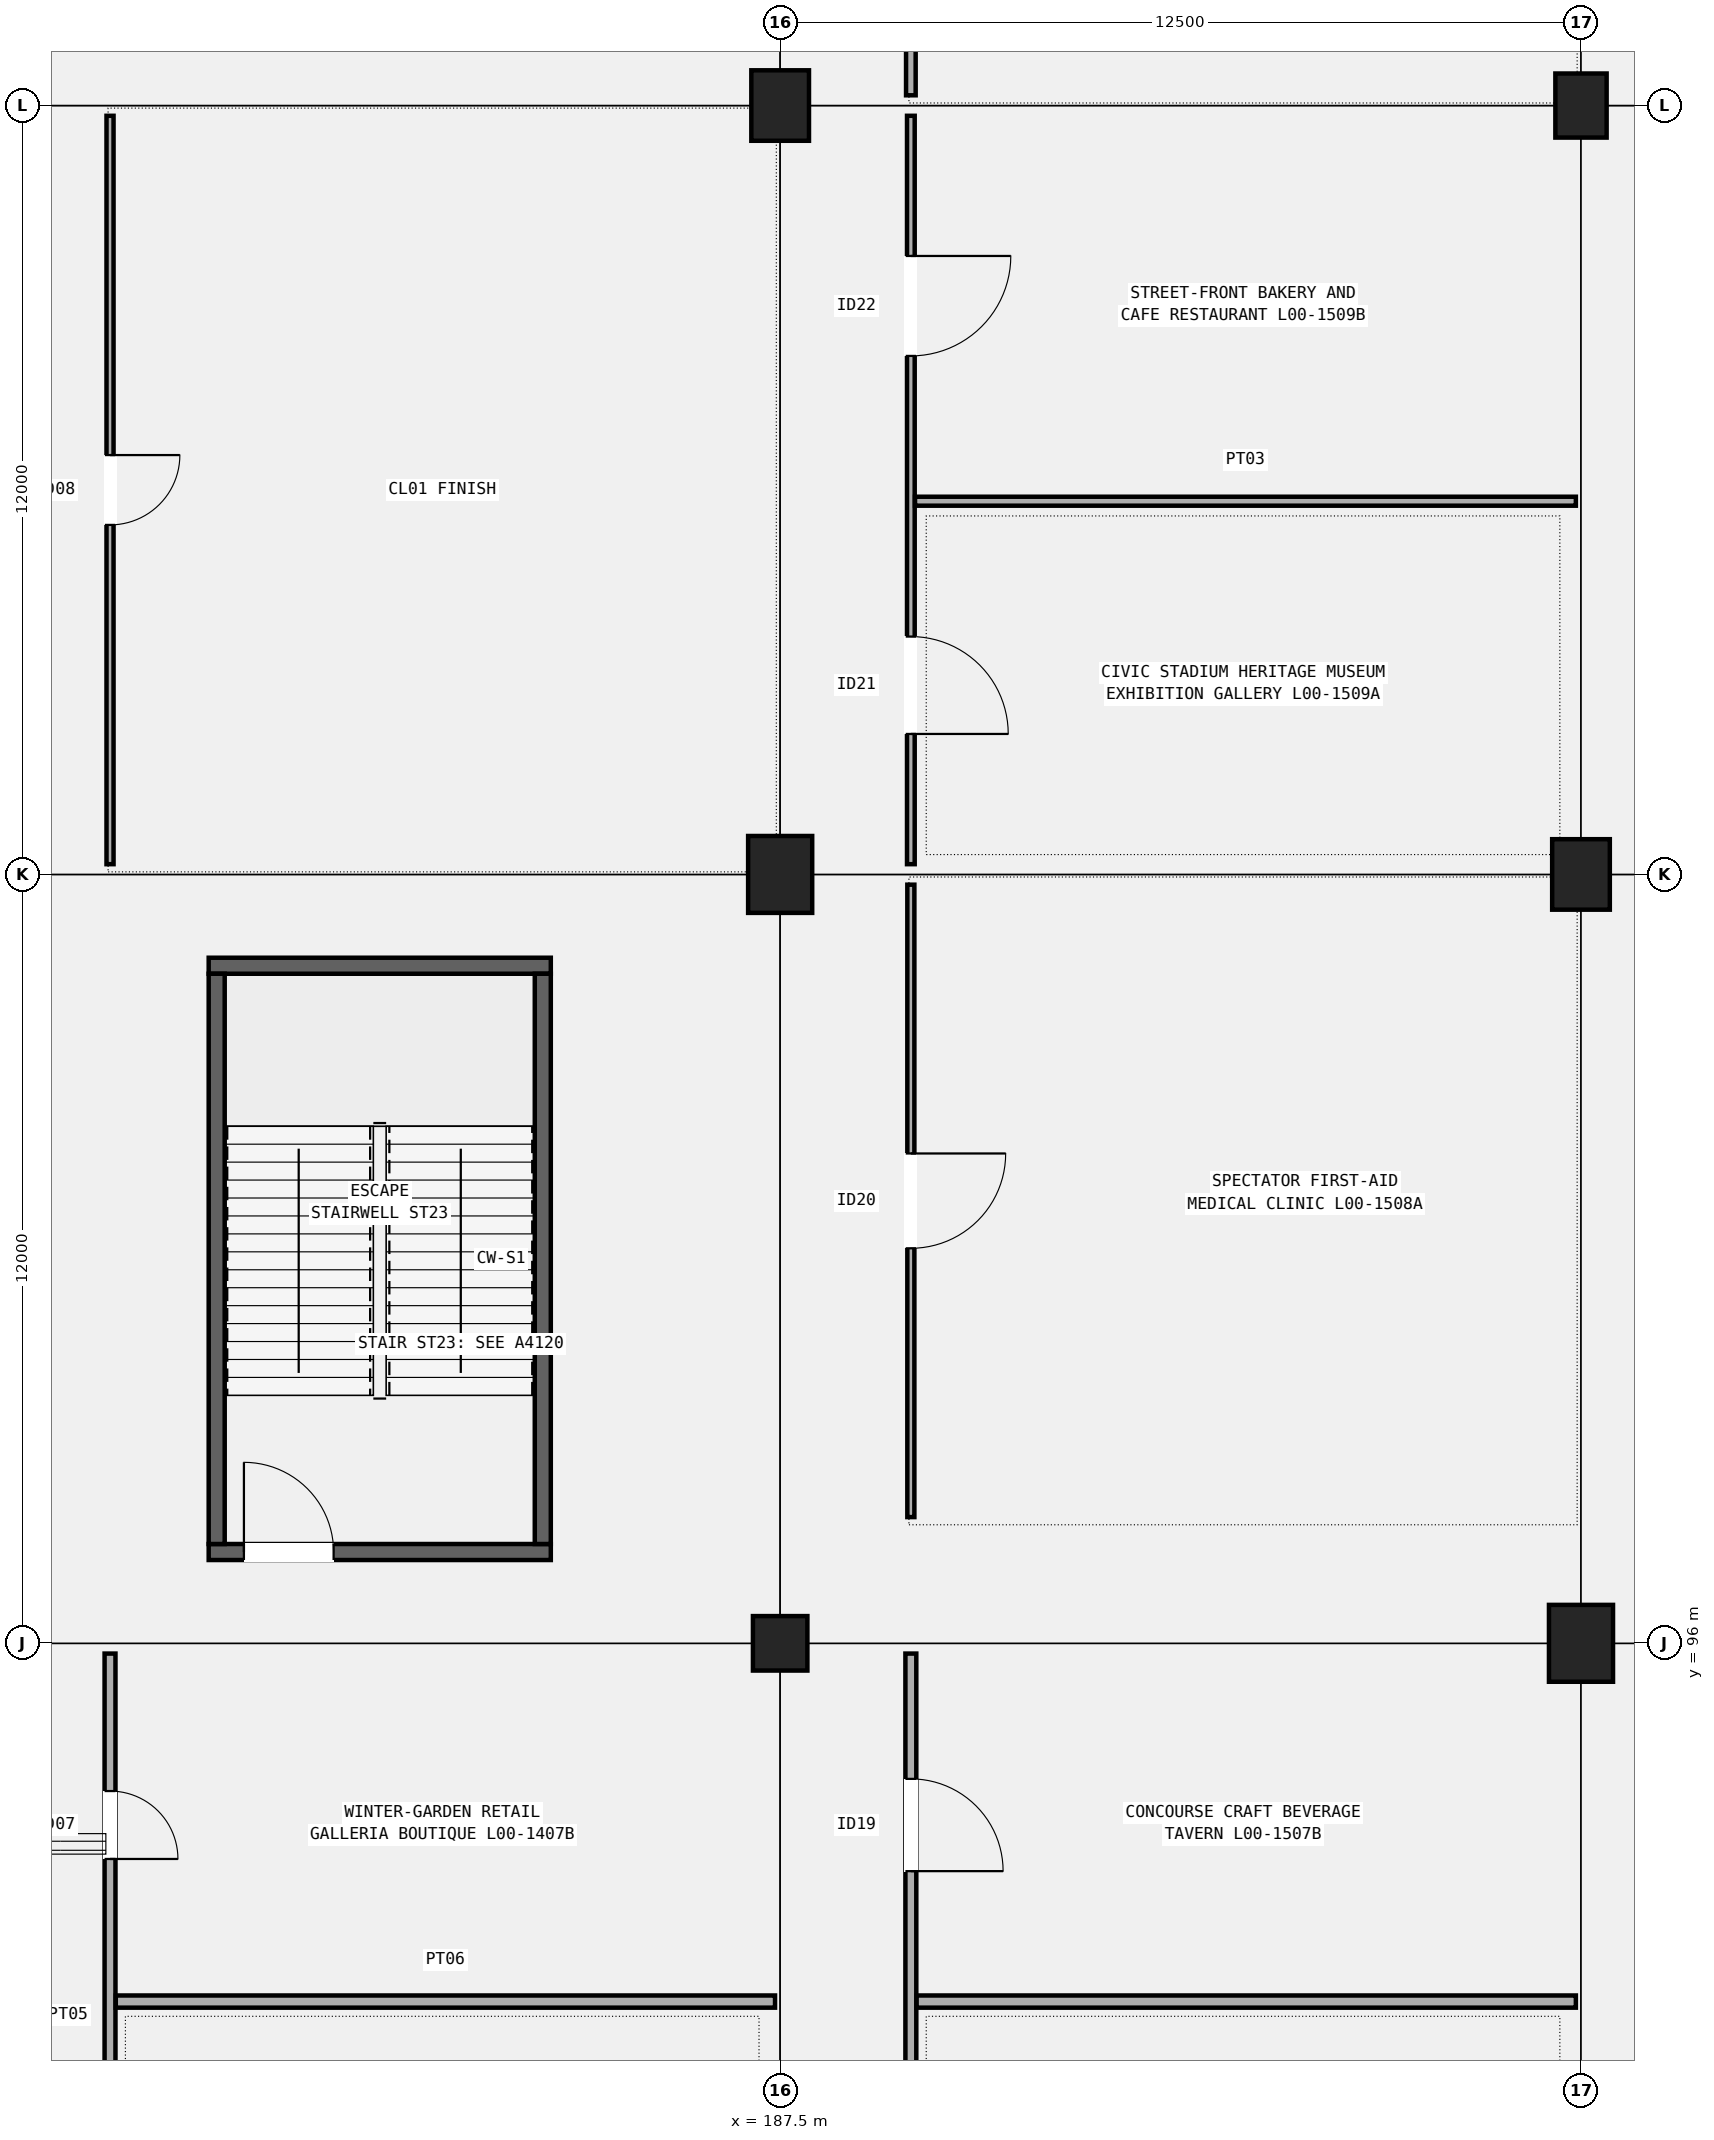
"""IFC4 building model, lengths in metres.
Left out: names, types, materials, properties, quantities, classifications, styles, units other than length and angle.
Written with IfcOpenShell. Run it as: python <this file> out.ifc"""

import sys

from ifc_helpers import new_model, si_unit, direction, frame, frame_2d, origin, origin_2d, place, context, subcontext, project, spatial, rectangle, circle, extrude, element, fill, save


model = new_model("IFC4")
c1 = context("Model", 3, precision=1e-05, world=origin(), true_north=direction((0.0, 1.0)))
c2 = subcontext(c1, "Body", "Model", "MODEL_VIEW")
j1 = project(units=[si_unit("LENGTHUNIT", "METRE"), si_unit("PLANEANGLEUNIT", "RADIAN")], contexts=[c1])
p1 = place(None, origin())
s1 = spatial("IfcSite", under=j1, at=p1, CompositionType="ELEMENT")
p2 = place(p1, origin())
s2 = spatial("IfcBuilding", under=s1, at=p2, CompositionType="ELEMENT")
p3 = place(p2, origin())
s3 = spatial("IfcBuildingStorey", under=s2, at=p3, CompositionType="ELEMENT", Elevation=0.0)
p4 = place(p3, frame((187.5, 96.0, 0.0), z_axis=(0.0, 0.0, 1.0), x_axis=(1.0, 0.0, 0.0)))
e1 = element("IfcColumn", 1, at=p4, inside=s3, PredefinedType="COLUMN", context=c2, shape_type="SweptSolid", body=[
    extrude(circle(Radius=0.425, at=origin_2d()), origin(), (0.0, 0.0, 1.0), 5.4),
])
p5 = place(p3, frame((187.5, 108.0, 0.0), z_axis=(0.0, 0.0, 1.0), x_axis=(1.0, 0.0, 0.0)))
e2 = element("IfcColumn", 2, at=p5, inside=s3, PredefinedType="COLUMN", context=c2, shape_type="SweptSolid", body=[
    extrude(rectangle(XDim=1.0, YDim=1.2, at=origin_2d()), origin(), (0.0, 0.0, 1.0), 5.4),
])
p6 = place(p3, frame((187.5, 120.0, 0.0), z_axis=(0.0, 0.0, 1.0), x_axis=(1.0, 0.0, 0.0)))
e3 = element("IfcColumn", 3, at=p6, inside=s3, PredefinedType="COLUMN", context=c2, shape_type="SweptSolid", body=[
    extrude(rectangle(XDim=0.9, YDim=1.1, at=origin_2d()), origin(), (0.0, 0.0, 1.0), 5.4),
])
p7 = place(p3, frame((200.0, 96.0, 0.0), z_axis=(0.0, 0.0, 1.0), x_axis=(1.0, 0.0, 0.0)))
e4 = element("IfcColumn", 4, at=p7, inside=s3, PredefinedType="COLUMN", context=c2, shape_type="SweptSolid", body=[
    extrude(rectangle(XDim=1.0, YDim=1.2, at=origin_2d()), origin(), (0.0, 0.0, 1.0), 5.4),
])
p8 = place(p3, frame((200.0, 108.0, 0.0), z_axis=(0.0, 0.0, 1.0), x_axis=(1.0, 0.0, 0.0)))
e5 = element("IfcColumn", 5, at=p8, inside=s3, PredefinedType="COLUMN", context=c2, shape_type="SweptSolid", body=[
    extrude(rectangle(XDim=0.9, YDim=1.1, at=origin_2d()), origin(), (0.0, 0.0, 1.0), 5.4),
])
p9 = place(p3, frame((200.0, 120.0, 0.0), z_axis=(0.0, 0.0, 1.0), x_axis=(1.0, 0.0, 0.0)))
e6 = element("IfcColumn", 6, at=p9, inside=s3, PredefinedType="COLUMN", context=c2, shape_type="SweptSolid", body=[
    extrude(rectangle(XDim=0.8, YDim=1.0, at=origin_2d()), origin(), (0.0, 0.0, 1.0), 5.4),
])
p10 = place(p3, frame((178.58, 97.425, 0.0), z_axis=(0.0, 0.0, 1.0), x_axis=(1.0, 0.0, 0.0)))
e7 = element("IfcWall", 7, at=p10, inside=s3, PredefinedType="SHEAR", context=c2, shape_type="SweptSolid", body=[
    extrude(rectangle(XDim=5.34, YDim=0.25, at=frame_2d((2.67, 0.0))), origin(), (0.0, 0.0, 1.0), 5.14),
])
p11 = place(p10, frame((0.55, 0.0, 0.0)))
e8 = element("IfcOpeningElement", 8, at=p11, cuts=e7, PredefinedType="OPENING", context=c2, shape_type="SweptSolid", body=[
    extrude(rectangle(XDim=1.4, YDim=2.15, at=frame_2d((0.7, 1.075))), frame((0.0, 0.135, 0.0), z_axis=(0.0, -1.0, 0.0), x_axis=(1.0, 0.0, 0.0)), (0.0, 0.0, 1.0), 0.27),
])
p12 = place(p3, frame((178.58, 106.575, 0.0), z_axis=(0.0, 0.0, 1.0), x_axis=(1.0, 0.0, 0.0)))
e9 = element("IfcWall", 9, at=p12, inside=s3, PredefinedType="SHEAR", context=c2, shape_type="SweptSolid", body=[
    extrude(rectangle(XDim=5.34, YDim=0.25, at=frame_2d((2.67, 0.0))), origin(), (0.0, 0.0, 1.0), 5.14),
])
for number, where, z_axis, x_axis in (
    (10, (178.705, 97.55, 0.0), (0.0, 0.0, 1.0), (0.0, 1.0, 0.0)),
    (11, (183.795, 97.55, 0.0), (0.0, 0.0, 1.0), (0.0, 1.0, 0.0)),
):
    element("IfcWall", number, at=place(p3, frame(where, z_axis=z_axis, x_axis=x_axis)), inside=s3, PredefinedType="SHEAR", context=c2, shape_type="SweptSolid", body=[
        extrude(rectangle(XDim=8.9, YDim=0.25, at=frame_2d((4.45, 0.0))), origin(), (0.0, 0.0, 1.0), 5.14),
    ])
p13 = place(p3, frame((177.04, 84.16, 0.0), z_axis=(0.0, 0.0, 1.0), x_axis=(0.0, 1.0, 0.0)))
e12 = element("IfcWall", 12, at=p13, inside=s3, PredefinedType="PARTITIONING", context=c2, shape_type="SweptSolid", body=[
    extrude(rectangle(XDim=11.68, YDim=0.17, at=frame_2d((5.84, 0.0))), origin(), (0.0, 0.0, 1.0), 4.52),
])
p14 = place(p13, frame((3.599, 0.0, 0.0), z_axis=(0.0, 0.0, 1.0), x_axis=(-1.0, 0.0, 0.0)))
e13 = element("IfcOpeningElement", 13, at=p14, cuts=e12, PredefinedType="OPENING", context=c2, shape_type="SweptSolid", body=[
    extrude(rectangle(XDim=1.03, YDim=2.12, at=frame_2d((0.515, 1.06))), frame((0.0, 0.095, 0.0), z_axis=(0.0, -1.0, 0.0), x_axis=(1.0, 0.0, 0.0)), (0.0, 0.0, 1.0), 0.19),
])
p15 = place(p13, frame((9.534, 0.0, 0.0), z_axis=(0.0, 0.0, 1.0), x_axis=(-1.0, 0.0, 0.0)))
e14 = element("IfcOpeningElement", 14, at=p15, cuts=e12, PredefinedType="OPENING", context=c2, shape_type="SweptSolid", body=[
    extrude(rectangle(XDim=1.06, YDim=2.15, at=frame_2d((0.53, 1.075))), frame((0.0, 0.095, 0.0), z_axis=(0.0, -1.0, 0.0), x_axis=(1.0, 0.0, 0.0)), (0.0, 0.0, 1.0), 0.19),
])
p16 = place(p3, frame((177.13, 90.409, 0.0), z_axis=(0.0, 0.0, 1.0), x_axis=(1.0, 0.0, 0.0)))
e15 = element("IfcWall", 15, at=p16, inside=s3, PredefinedType="PARTITIONING", context=c2, shape_type="SweptSolid", body=[
    extrude(rectangle(XDim=10.29, YDim=0.19, at=frame_2d((5.145, 0.0))), origin(), (0.0, 0.0, 1.0), 4.52),
])
p17 = place(p3, frame((177.04, 108.16, 0.0), z_axis=(0.0, 0.0, 1.0), x_axis=(0.0, 1.0, 0.0)))
e16 = element("IfcWall", 16, at=p17, inside=s3, PredefinedType="PARTITIONING", context=c2, shape_type="SweptSolid", body=[
    extrude(rectangle(XDim=11.68, YDim=0.11, at=frame_2d((5.84, 0.0))), origin(), (0.0, 0.0, 1.0), 4.52),
])
p18 = place(p17, frame((6.385, 0.0, 0.0), z_axis=(0.0, 0.0, 1.0), x_axis=(-1.0, 0.0, 0.0)))
e17 = element("IfcOpeningElement", 17, at=p18, cuts=e16, PredefinedType="OPENING", context=c2, shape_type="SweptSolid", body=[
    extrude(rectangle(XDim=1.09, YDim=2.16, at=frame_2d((0.545, 1.08))), frame((0.0, 0.065, 0.0), z_axis=(0.0, -1.0, 0.0), x_axis=(1.0, 0.0, 0.0)), (0.0, 0.0, 1.0), 0.13),
])
p19 = place(p3, frame((189.54, 84.16, 0.0), z_axis=(0.0, 0.0, 1.0), x_axis=(0.0, 1.0, 0.0)))
e18 = element("IfcWall", 18, at=p19, inside=s3, PredefinedType="PARTITIONING", context=c2, shape_type="SweptSolid", body=[
    extrude(rectangle(XDim=11.68, YDim=0.17, at=frame_2d((5.84, 0.0))), origin(), (0.0, 0.0, 1.0), 4.52),
])
p20 = place(p19, frame((3.784, 0.0, 0.0), z_axis=(0.0, 0.0, 1.0), x_axis=(-1.0, 0.0, 0.0)))
e19 = element("IfcOpeningElement", 19, at=p20, cuts=e18, PredefinedType="OPENING", context=c2, shape_type="SweptSolid", body=[
    extrude(rectangle(XDim=1.4, YDim=2.24, at=frame_2d((0.7, 1.12))), frame((0.0, 0.095, 0.0), z_axis=(0.0, -1.0, 0.0), x_axis=(1.0, 0.0, 0.0)), (0.0, 0.0, 1.0), 0.19),
])
p21 = place(p19, frame((9.724, 0.0, 0.0), z_axis=(0.0, 0.0, 1.0), x_axis=(-1.0, 0.0, 0.0)))
e20 = element("IfcOpeningElement", 20, at=p21, cuts=e18, PredefinedType="OPENING", context=c2, shape_type="SweptSolid", body=[
    extrude(rectangle(XDim=1.44, YDim=2.26, at=frame_2d((0.72, 1.13))), frame((0.0, 0.095, 0.0), z_axis=(0.0, -1.0, 0.0), x_axis=(1.0, 0.0, 0.0)), (0.0, 0.0, 1.0), 0.19),
])
p22 = place(p3, frame((189.63, 90.409, 0.0), z_axis=(0.0, 0.0, 1.0), x_axis=(1.0, 0.0, 0.0)))
e21 = element("IfcWall", 21, at=p22, inside=s3, PredefinedType="PARTITIONING", context=c2, shape_type="SweptSolid", body=[
    extrude(rectangle(XDim=10.29, YDim=0.19, at=frame_2d((5.145, 0.0))), origin(), (0.0, 0.0, 1.0), 4.52),
])
p23 = place(p3, frame((189.54, 97.97, 0.0), z_axis=(0.0, 0.0, 1.0), x_axis=(0.0, 1.0, 0.0)))
e22 = element("IfcWall", 22, at=p23, inside=s3, PredefinedType="PARTITIONING", context=c2, shape_type="SweptSolid", body=[
    extrude(rectangle(XDim=9.87, YDim=0.11, at=frame_2d((4.935, 0.0))), origin(), (0.0, 0.0, 1.0), 4.52),
])
p24 = place(p23, frame((5.675, 0.0, 0.0), z_axis=(0.0, 0.0, 1.0), x_axis=(-1.0, 0.0, 0.0)))
e23 = element("IfcOpeningElement", 23, at=p24, cuts=e22, PredefinedType="OPENING", context=c2, shape_type="SweptSolid", body=[
    extrude(rectangle(XDim=1.48, YDim=2.24, at=frame_2d((0.74, 1.12))), frame((0.0, 0.065, 0.0), z_axis=(0.0, -1.0, 0.0), x_axis=(1.0, 0.0, 0.0)), (0.0, 0.0, 1.0), 0.13),
])
p25 = place(p3, frame((189.54, 108.16, 0.0), z_axis=(0.0, 0.0, 1.0), x_axis=(0.0, 1.0, 0.0)))
e24 = element("IfcWall", 24, at=p25, inside=s3, PredefinedType="PARTITIONING", context=c2, shape_type="SweptSolid", body=[
    extrude(rectangle(XDim=11.68, YDim=0.12, at=frame_2d((5.84, 0.0))), origin(), (0.0, 0.0, 1.0), 4.52),
])
p26 = place(p25, frame((3.552, 0.0, 0.0), z_axis=(0.0, 0.0, 1.0), x_axis=(-1.0, 0.0, 0.0)))
e25 = element("IfcOpeningElement", 25, at=p26, cuts=e24, PredefinedType="OPENING", context=c2, shape_type="SweptSolid", body=[
    extrude(rectangle(XDim=1.52, YDim=2.28, at=frame_2d((0.76, 1.14))), frame((0.0, 0.07, 0.0), z_axis=(0.0, -1.0, 0.0), x_axis=(1.0, 0.0, 0.0)), (0.0, 0.0, 1.0), 0.14),
])
p27 = place(p25, frame((9.492, 0.0, 0.0), z_axis=(0.0, 0.0, 1.0), x_axis=(-1.0, 0.0, 0.0)))
e26 = element("IfcOpeningElement", 26, at=p27, cuts=e24, PredefinedType="OPENING", context=c2, shape_type="SweptSolid", body=[
    extrude(rectangle(XDim=1.56, YDim=2.26, at=frame_2d((0.78, 1.13))), frame((0.0, 0.07, 0.0), z_axis=(0.0, -1.0, 0.0), x_axis=(1.0, 0.0, 0.0)), (0.0, 0.0, 1.0), 0.14),
])
p28 = place(p3, frame((189.605, 113.825, 0.0), z_axis=(0.0, 0.0, 1.0), x_axis=(1.0, 0.0, 0.0)))
e27 = element("IfcWall", 27, at=p28, inside=s3, PredefinedType="PARTITIONING", context=c2, shape_type="SweptSolid", body=[
    extrude(rectangle(XDim=10.315, YDim=0.14, at=frame_2d((5.157, 0.0))), origin(), (0.0, 0.0, 1.0), 4.52),
])
p29 = place(p3, frame((189.54, 120.16, 0.0), z_axis=(0.0, 0.0, 1.0), x_axis=(0.0, 1.0, 0.0)))
e28 = element("IfcWall", 28, at=p29, inside=s3, PredefinedType="PARTITIONING", context=c2, shape_type="SweptSolid", body=[
    extrude(rectangle(XDim=11.68, YDim=0.15, at=frame_2d((5.84, 0.0))), origin(), (0.0, 0.0, 1.0), 4.52),
])
p30 = place(p29, frame((6.64, 0.0, 0.0), z_axis=(0.0, 0.0, 1.0), x_axis=(-1.0, 0.0, 0.0)))
e29 = element("IfcOpeningElement", 29, at=p30, cuts=e28, PredefinedType="OPENING", context=c2, shape_type="SweptSolid", body=[
    extrude(rectangle(XDim=1.6, YDim=2.3, at=frame_2d((0.8, 1.15))), frame((0.0, 0.085, 0.0), z_axis=(0.0, -1.0, 0.0), x_axis=(1.0, 0.0, 0.0)), (0.0, 0.0, 1.0), 0.17),
])
p31 = place(p11, origin())
e30 = element("IfcDoor", 30, at=p31, inside=s3, OperationType="SINGLE_SWING_LEFT", PredefinedType="DOOR", context=c2, shape_type="SweptSolid", body=[
    extrude(rectangle(XDim=1.4, YDim=2.15, at=frame_2d((0.7, 1.075))), frame((0.0, 0.025, 0.0), z_axis=(0.0, -1.0, 0.0), x_axis=(1.0, 0.0, 0.0)), (0.0, 0.0, 1.0), 0.05),
])
fill(e8, e30)
p32 = place(p15, origin())
e31 = element("IfcDoor", 31, at=p32, inside=s3, OperationType="SINGLE_SWING_RIGHT", PredefinedType="DOOR", context=c2, shape_type="SweptSolid", body=[
    extrude(rectangle(XDim=1.06, YDim=2.15, at=frame_2d((0.53, 1.075))), frame((0.0, 0.025, 0.0), z_axis=(0.0, -1.0, 0.0), x_axis=(1.0, 0.0, 0.0)), (0.0, 0.0, 1.0), 0.05),
])
fill(e14, e31)
p33 = place(p18, origin())
e32 = element("IfcDoor", 32, at=p33, inside=s3, OperationType="SINGLE_SWING_LEFT", PredefinedType="DOOR", context=c2, shape_type="SweptSolid", body=[
    extrude(rectangle(XDim=1.09, YDim=2.16, at=frame_2d((0.545, 1.08))), frame((0.0, 0.025, 0.0), z_axis=(0.0, -1.0, 0.0), x_axis=(1.0, 0.0, 0.0)), (0.0, 0.0, 1.0), 0.05),
])
fill(e17, e32)
p34 = place(p21, origin())
e33 = element("IfcDoor", 33, at=p34, inside=s3, OperationType="SINGLE_SWING_RIGHT", PredefinedType="DOOR", context=c2, shape_type="SweptSolid", body=[
    extrude(rectangle(XDim=1.44, YDim=2.26, at=frame_2d((0.72, 1.13))), frame((0.0, 0.025, 0.0), z_axis=(0.0, -1.0, 0.0), x_axis=(1.0, 0.0, 0.0)), (0.0, 0.0, 1.0), 0.05),
])
fill(e20, e33)
p35 = place(p24, origin())
e34 = element("IfcDoor", 34, at=p35, inside=s3, OperationType="SINGLE_SWING_LEFT", PredefinedType="DOOR", context=c2, shape_type="SweptSolid", body=[
    extrude(rectangle(XDim=1.48, YDim=2.24, at=frame_2d((0.74, 1.12))), frame((0.0, 0.025, 0.0), z_axis=(0.0, -1.0, 0.0), x_axis=(1.0, 0.0, 0.0)), (0.0, 0.0, 1.0), 0.05),
])
fill(e23, e34)
p36 = place(p26, origin())
e35 = element("IfcDoor", 35, at=p36, inside=s3, OperationType="SINGLE_SWING_RIGHT", PredefinedType="DOOR", context=c2, shape_type="SweptSolid", body=[
    extrude(rectangle(XDim=1.52, YDim=2.28, at=frame_2d((0.76, 1.14))), frame((0.0, 0.025, 0.0), z_axis=(0.0, -1.0, 0.0), x_axis=(1.0, 0.0, 0.0)), (0.0, 0.0, 1.0), 0.05),
])
fill(e25, e35)
p37 = place(p27, origin())
e36 = element("IfcDoor", 36, at=p37, inside=s3, OperationType="SINGLE_SWING_LEFT", PredefinedType="DOOR", context=c2, shape_type="SweptSolid", body=[
    extrude(rectangle(XDim=1.56, YDim=2.26, at=frame_2d((0.78, 1.13))), frame((0.0, 0.025, 0.0), z_axis=(0.0, -1.0, 0.0), x_axis=(1.0, 0.0, 0.0)), (0.0, 0.0, 1.0), 0.05),
])
fill(e26, e36)
save(model, sys.argv[1])
